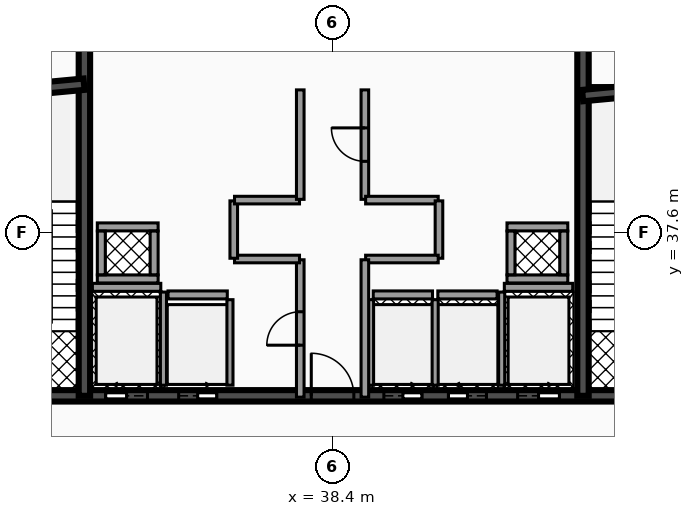
"""IFC4 building model, lengths in metres.
Left out: names, types, materials, properties, quantities, classifications, styles, units other than length and angle.
Written with IfcOpenShell. Run it as: python <this file> out.ifc"""

import sys

from ifc_helpers import new_model, si_unit, direction, frame, frame_2d, origin, place, context, subcontext, project, spatial, rectangle, extrude, element, fill, save


model = new_model("IFC4")
c1 = context("Model", 3, precision=1e-05, world=origin(), true_north=direction((0.0, 1.0)))
c2 = subcontext(c1, "Body", "Model", "MODEL_VIEW")
j1 = project(units=[si_unit("LENGTHUNIT", "METRE"), si_unit("PLANEANGLEUNIT", "RADIAN")], contexts=[c1])
p1 = place(None, origin())
s1 = spatial("IfcSite", under=j1, at=p1, CompositionType="ELEMENT")
p2 = place(p1, origin())
s2 = spatial("IfcBuilding", under=s1, at=p2, CompositionType="ELEMENT")
p3 = place(p2, frame((0.0, 0.0, 199.92)))
s3 = spatial("IfcBuildingStorey", under=s2, at=p3, CompositionType="ELEMENT", Elevation=199.92)
p4 = place(p3, frame((28.5, 33.3, 0.0), z_axis=(0.0, 0.0, 1.0), x_axis=(1.0, 0.0, 0.0)))
e1 = element("IfcWall", 1, at=p4, inside=s3, PredefinedType="SHEAR", context=c2, shape_type="SweptSolid", body=[
    extrude(rectangle(XDim=19.86, YDim=0.3, at=frame_2d((9.93, 0.0))), origin(), (0.0, 0.0, 1.0), 4.12),
])
p5 = place(p4, frame((3.93, 0.0, 0.0)))
e2 = element("IfcOpeningElement", 2, at=p5, cuts=e1, PredefinedType="OPENING", context=c2, shape_type="SweptSolid", body=[
    extrude(rectangle(XDim=1.1, YDim=2.15, at=frame_2d((0.55, 1.075))), frame((0.0, 0.16, 0.0), z_axis=(0.0, -1.0, 0.0), x_axis=(1.0, 0.0, 0.0)), (0.0, 0.0, 1.0), 0.32),
])
p6 = place(p4, frame((14.77, 0.0, 0.0)))
e3 = element("IfcOpeningElement", 3, at=p6, cuts=e1, PredefinedType="OPENING", context=c2, shape_type="SweptSolid", body=[
    extrude(rectangle(XDim=1.1, YDim=2.15, at=frame_2d((0.55, 1.075))), frame((0.0, 0.16, 0.0), z_axis=(0.0, -1.0, 0.0), x_axis=(1.0, 0.0, 0.0)), (0.0, 0.0, 1.0), 0.32),
])
p7 = place(p4, frame((11.25, 0.0, 0.0)))
e4 = element("IfcOpeningElement", 4, at=p7, cuts=e1, PredefinedType="OPENING", context=c2, shape_type="SweptSolid", body=[
    extrude(rectangle(XDim=1.0, YDim=2.1, at=frame_2d((0.5, 1.05))), frame((0.0, 0.16, 0.0), z_axis=(0.0, -1.0, 0.0), x_axis=(1.0, 0.0, 0.0)), (0.0, 0.0, 1.0), 0.32),
])
p8 = place(p4, frame((12.95, 0.0, 0.0)))
e5 = element("IfcOpeningElement", 5, at=p8, cuts=e1, PredefinedType="OPENING", context=c2, shape_type="SweptSolid", body=[
    extrude(rectangle(XDim=1.0, YDim=2.1, at=frame_2d((0.5, 1.05))), frame((0.0, 0.16, 0.0), z_axis=(0.0, -1.0, 0.0), x_axis=(1.0, 0.0, 0.0)), (0.0, 0.0, 1.0), 0.32),
])
p9 = place(p4, frame((5.85, 0.0, 0.0)))
e6 = element("IfcOpeningElement", 6, at=p9, cuts=e1, PredefinedType="OPENING", context=c2, shape_type="SweptSolid", body=[
    extrude(rectangle(XDim=1.0, YDim=2.1, at=frame_2d((0.5, 1.05))), frame((0.0, 0.16, 0.0), z_axis=(0.0, -1.0, 0.0), x_axis=(1.0, 0.0, 0.0)), (0.0, 0.0, 1.0), 0.32),
])
p10 = place(p4, frame((1.21, 0.0, 0.0)))
e7 = element("IfcOpeningElement", 7, at=p10, cuts=e1, PredefinedType="OPENING", context=c2, shape_type="SweptSolid", body=[
    extrude(rectangle(XDim=1.1, YDim=2.2, at=frame_2d((0.55, 1.1))), frame((0.0, 0.16, 0.0), z_axis=(0.0, -1.0, 0.0), x_axis=(1.0, 0.0, 0.0)), (0.0, 0.0, 1.0), 0.32),
])
p11 = place(p4, frame((9.34, 0.0, 0.0)))
e8 = element("IfcOpeningElement", 8, at=p11, cuts=e1, PredefinedType="OPENING", context=c2, shape_type="SweptSolid", body=[
    extrude(rectangle(XDim=1.12, YDim=2.05, at=frame_2d((0.56, 1.025))), frame((0.0, 0.16, 0.0), z_axis=(0.0, -1.0, 0.0), x_axis=(1.0, 0.0, 0.0)), (0.0, 0.0, 1.0), 0.32),
])
p12 = place(p4, frame((17.55, 0.0, 0.0)))
e9 = element("IfcOpeningElement", 9, at=p12, cuts=e1, PredefinedType="OPENING", context=c2, shape_type="SweptSolid", body=[
    extrude(rectangle(XDim=1.1, YDim=2.2, at=frame_2d((0.55, 1.1))), frame((0.0, 0.16, 0.0), z_axis=(0.0, -1.0, 0.0), x_axis=(1.0, 0.0, 0.0)), (0.0, 0.0, 1.0), 0.32),
])
for number, where, z_axis, x_axis in (
    (10, (31.87, 33.3, 0.0), (0.0, 0.0, 1.0), (0.0, 1.0, 0.0)),
    (11, (44.99, 33.3, 0.0), (0.0, 0.0, 1.0), (0.0, 1.0, 0.0)),
):
    element("IfcWall", number, at=place(p3, frame(where, z_axis=z_axis, x_axis=x_axis)), inside=s3, PredefinedType="SHEAR", context=c2, shape_type="SweptSolid", body=[
        extrude(rectangle(XDim=10.1, YDim=0.3, at=frame_2d((5.05, 0.0))), origin(), (0.0, 0.0, 1.0), 4.12),
    ])
p13 = place(p3, frame((28.64, 41.2, 0.0), z_axis=(0.0, 0.0, 1.0), x_axis=(0.995687118776, 0.092774789157, 0.0)))
e12 = element("IfcWall", 12, at=p13, inside=s3, PredefinedType="SHEAR", context=c2, shape_type="SweptSolid", body=[
    extrude(rectangle(XDim=3.234, YDim=0.3, at=frame_2d((1.617, 0.0))), origin(), (0.0, 0.0, 1.0), 4.12),
])
p14 = place(p3, frame((44.98, 41.2, 0.0), z_axis=(0.0, 0.0, 1.0), x_axis=(0.995686468965, 0.09278176286, 0.0)))
e13 = element("IfcWall", 13, at=p14, inside=s3, PredefinedType="SHEAR", context=c2, shape_type="SweptSolid", body=[
    extrude(rectangle(XDim=3.234, YDim=0.3, at=frame_2d((1.617, 0.0))), origin(), (0.0, 0.0, 1.0), 4.12),
])
p15 = place(p3, frame((32.08, 36.155, 0.0), z_axis=(0.0, 0.0, 1.0), x_axis=(1.0, 0.0, 0.0)))
e14 = element("IfcWall", 14, at=p15, inside=s3, PredefinedType="SOLIDWALL", context=c2, shape_type="SweptSolid", body=[
    extrude(rectangle(XDim=1.8, YDim=0.21, at=frame_2d((0.9, 0.0))), origin(), (0.0, 0.0, 1.0), 3.092),
])
p16 = place(p3, frame((33.95, 33.58, 0.0), z_axis=(0.0, 0.0, 1.0), x_axis=(0.0, 1.0, 0.0)))
e15 = element("IfcWall", 15, at=p16, inside=s3, PredefinedType="SOLIDWALL", context=c2, shape_type="SweptSolid", body=[
    extrude(rectangle(XDim=2.45, YDim=0.16, at=frame_2d((1.225, 0.0))), origin(), (0.0, 0.0, 1.0), 3.092),
])
p17 = place(p3, frame((42.92, 36.155, 0.0), z_axis=(0.0, 0.0, 1.0), x_axis=(1.0, 0.0, 0.0)))
e16 = element("IfcWall", 16, at=p17, inside=s3, PredefinedType="SOLIDWALL", context=c2, shape_type="SweptSolid", body=[
    extrude(rectangle(XDim=1.8, YDim=0.21, at=frame_2d((0.9, 0.0))), origin(), (0.0, 0.0, 1.0), 3.092),
])
p18 = place(p3, frame((42.85, 33.58, 0.0), z_axis=(0.0, 0.0, 1.0), x_axis=(0.0, 1.0, 0.0)))
e17 = element("IfcWall", 17, at=p18, inside=s3, PredefinedType="SOLIDWALL", context=c2, shape_type="SweptSolid", body=[
    extrude(rectangle(XDim=2.45, YDim=0.16, at=frame_2d((1.225, 0.0))), origin(), (0.0, 0.0, 1.0), 3.092),
])
p19 = place(p3, frame((39.47, 35.955, 0.0), z_axis=(0.0, 0.0, 1.0), x_axis=(1.0, 0.0, 0.0)))
e18 = element("IfcWall", 18, at=p19, inside=s3, PredefinedType="SOLIDWALL", context=c2, shape_type="SweptSolid", body=[
    extrude(rectangle(XDim=1.56, YDim=0.21, at=frame_2d((0.78, 0.0))), origin(), (0.0, 0.0, 1.0), 3.092),
])
for number, where, z_axis, x_axis in (
    (19, (39.4, 33.58, 0.0), (0.0, 0.0, 1.0), (0.0, 1.0, 0.0)),
    (20, (41.1, 33.58, 0.0), (0.0, 0.0, 1.0), (0.0, 1.0, 0.0)),
):
    element("IfcWall", number, at=place(p3, frame(where, z_axis=z_axis, x_axis=x_axis)), inside=s3, PredefinedType="SOLIDWALL", context=c2, shape_type="SweptSolid", body=[
        extrude(rectangle(XDim=2.25, YDim=0.16, at=frame_2d((1.125, 0.0))), origin(), (0.0, 0.0, 1.0), 3.092),
    ])
p20 = place(p3, frame((41.17, 35.955, 0.0), z_axis=(0.0, 0.0, 1.0), x_axis=(1.0, 0.0, 0.0)))
e21 = element("IfcWall", 21, at=p20, inside=s3, PredefinedType="SOLIDWALL", context=c2, shape_type="SweptSolid", body=[
    extrude(rectangle(XDim=1.56, YDim=0.21, at=frame_2d((0.78, 0.0))), origin(), (0.0, 0.0, 1.0), 3.092),
])
p21 = place(p3, frame((34.07, 35.955, 0.0), z_axis=(0.0, 0.0, 1.0), x_axis=(1.0, 0.0, 0.0)))
e22 = element("IfcWall", 22, at=p21, inside=s3, PredefinedType="SOLIDWALL", context=c2, shape_type="SweptSolid", body=[
    extrude(rectangle(XDim=1.56, YDim=0.21, at=frame_2d((0.78, 0.0))), origin(), (0.0, 0.0, 1.0), 3.092),
])
p22 = place(p3, frame((35.7, 33.58, 0.0), z_axis=(0.0, 0.0, 1.0), x_axis=(0.0, 1.0, 0.0)))
e23 = element("IfcWall", 23, at=p22, inside=s3, PredefinedType="SOLIDWALL", context=c2, shape_type="SweptSolid", body=[
    extrude(rectangle(XDim=2.25, YDim=0.16, at=frame_2d((1.125, 0.0))), origin(), (0.0, 0.0, 1.0), 3.092),
])
for number, where, z_axis, x_axis in (
    (24, (32.21, 36.375, 0.0), (0.0, 0.0, 1.0), (1.0, 0.0, 0.0)),
    (25, (32.21, 37.745, 0.0), (0.0, 0.0, 1.0), (1.0, 0.0, 0.0)),
):
    element("IfcWall", number, at=place(p3, frame(where, z_axis=z_axis, x_axis=x_axis)), inside=s3, PredefinedType="SOLIDWALL", context=c2, shape_type="SweptSolid", body=[
        extrude(rectangle(XDim=1.6, YDim=0.21, at=frame_2d((0.8, 0.0))), origin(), (0.0, 0.0, 1.0), 4.12),
    ])
for number, where, z_axis, x_axis in (
    (26, (32.315, 36.485, 0.0), (0.0, 0.0, 1.0), (0.0, 1.0, 0.0)),
    (27, (33.705, 36.485, 0.0), (0.0, 0.0, 1.0), (0.0, 1.0, 0.0)),
):
    element("IfcWall", number, at=place(p3, frame(where, z_axis=z_axis, x_axis=x_axis)), inside=s3, PredefinedType="SOLIDWALL", context=c2, shape_type="SweptSolid", body=[
        extrude(rectangle(XDim=1.15, YDim=0.21, at=frame_2d((0.575, 0.0))), origin(), (0.0, 0.0, 1.0), 4.12),
    ])
for number, where, z_axis, x_axis in (
    (28, (42.99, 36.375, 0.0), (0.0, 0.0, 1.0), (1.0, 0.0, 0.0)),
    (29, (42.99, 37.745, 0.0), (0.0, 0.0, 1.0), (1.0, 0.0, 0.0)),
):
    element("IfcWall", number, at=place(p3, frame(where, z_axis=z_axis, x_axis=x_axis)), inside=s3, PredefinedType="SOLIDWALL", context=c2, shape_type="SweptSolid", body=[
        extrude(rectangle(XDim=1.6, YDim=0.21, at=frame_2d((0.8, 0.0))), origin(), (0.0, 0.0, 1.0), 4.12),
    ])
for number, where, z_axis, x_axis in (
    (30, (43.095, 36.485, 0.0), (0.0, 0.0, 1.0), (0.0, 1.0, 0.0)),
    (31, (44.485, 36.485, 0.0), (0.0, 0.0, 1.0), (0.0, 1.0, 0.0)),
):
    element("IfcWall", number, at=place(p3, frame(where, z_axis=z_axis, x_axis=x_axis)), inside=s3, PredefinedType="SOLIDWALL", context=c2, shape_type="SweptSolid", body=[
        extrude(rectangle(XDim=1.15, YDim=0.21, at=frame_2d((0.575, 0.0))), origin(), (0.0, 0.0, 1.0), 4.12),
    ])
p23 = place(p3, frame((37.55, 33.265, 0.0), z_axis=(0.0, 0.0, 1.0), x_axis=(0.0, 1.0, 0.0)))
e32 = element("IfcWall", 32, at=p23, inside=s3, PredefinedType="PARTITIONING", context=c2, shape_type="SweptSolid", body=[
    extrude(rectangle(XDim=3.615, YDim=0.2, at=frame_2d((1.808, 0.0))), origin(), (0.0, 0.0, 1.0), 3.077),
])
p24 = place(p23, frame((1.367, 0.0, 0.0)))
e33 = element("IfcOpeningElement", 33, at=p24, cuts=e32, PredefinedType="OPENING", context=c2, shape_type="SweptSolid", body=[
    extrude(rectangle(XDim=0.88, YDim=2.05, at=frame_2d((0.44, 1.025))), frame((0.0, 0.11, 0.0), z_axis=(0.0, -1.0, 0.0), x_axis=(1.0, 0.0, 0.0)), (0.0, 0.0, 1.0), 0.22),
])
p25 = place(p3, frame((35.82, 36.9, 0.0), z_axis=(0.0, 0.0, 1.0), x_axis=(1.0, 0.0, 0.0)))
e34 = element("IfcWall", 34, at=p25, inside=s3, PredefinedType="PARTITIONING", context=c2, shape_type="SweptSolid", body=[
    extrude(rectangle(XDim=1.71, YDim=0.2, at=frame_2d((0.855, 0.0))), origin(), (0.0, 0.0, 1.0), 3.077),
])
p26 = place(p3, frame((35.8, 36.92, 0.0), z_axis=(0.0, 0.0, 1.0), x_axis=(0.0, 1.0, 0.0)))
e35 = element("IfcWall", 35, at=p26, inside=s3, PredefinedType="PARTITIONING", context=c2, shape_type="SweptSolid", body=[
    extrude(rectangle(XDim=1.51, YDim=0.2, at=frame_2d((0.755, 0.0))), origin(), (0.0, 0.0, 1.0), 3.077),
])
p27 = place(p3, frame((35.82, 38.45, 0.0), z_axis=(0.0, 0.0, 1.0), x_axis=(1.0, 0.0, 0.0)))
e36 = element("IfcWall", 36, at=p27, inside=s3, PredefinedType="PARTITIONING", context=c2, shape_type="SweptSolid", body=[
    extrude(rectangle(XDim=1.71, YDim=0.2, at=frame_2d((0.855, 0.0))), origin(), (0.0, 0.0, 1.0), 3.077),
])
p28 = place(p3, frame((37.55, 38.47, 0.0), z_axis=(0.0, 0.0, 1.0), x_axis=(0.0, 1.0, 0.0)))
e37 = element("IfcWall", 37, at=p28, inside=s3, PredefinedType="PARTITIONING", context=c2, shape_type="SweptSolid", body=[
    extrude(rectangle(XDim=2.88, YDim=0.2, at=frame_2d((1.44, 0.0))), origin(), (0.0, 0.0, 1.0), 3.077),
])
p29 = place(p3, frame((39.25, 38.47, 0.0), z_axis=(0.0, 0.0, 1.0), x_axis=(0.0, 1.0, 0.0)))
e38 = element("IfcWall", 38, at=p29, inside=s3, PredefinedType="PARTITIONING", context=c2, shape_type="SweptSolid", body=[
    extrude(rectangle(XDim=2.88, YDim=0.2, at=frame_2d((1.44, 0.0))), origin(), (0.0, 0.0, 1.0), 3.077),
])
p30 = place(p29, frame((1.0, 0.0, 0.0)))
e39 = element("IfcOpeningElement", 39, at=p30, cuts=e38, PredefinedType="OPENING", context=c2, shape_type="SweptSolid", body=[
    extrude(rectangle(XDim=0.88, YDim=2.05, at=frame_2d((0.44, 1.025))), frame((0.0, 0.11, 0.0), z_axis=(0.0, -1.0, 0.0), x_axis=(1.0, 0.0, 0.0)), (0.0, 0.0, 1.0), 0.22),
])
p31 = place(p3, frame((39.27, 38.45, 0.0), z_axis=(0.0, 0.0, 1.0), x_axis=(1.0, 0.0, 0.0)))
e40 = element("IfcWall", 40, at=p31, inside=s3, PredefinedType="PARTITIONING", context=c2, shape_type="SweptSolid", body=[
    extrude(rectangle(XDim=1.91, YDim=0.2, at=frame_2d((0.955, 0.0))), origin(), (0.0, 0.0, 1.0), 3.077),
])
p32 = place(p3, frame((41.2, 36.92, 0.0), z_axis=(0.0, 0.0, 1.0), x_axis=(0.0, 1.0, 0.0)))
e41 = element("IfcWall", 41, at=p32, inside=s3, PredefinedType="PARTITIONING", context=c2, shape_type="SweptSolid", body=[
    extrude(rectangle(XDim=1.51, YDim=0.2, at=frame_2d((0.755, 0.0))), origin(), (0.0, 0.0, 1.0), 3.077),
])
p33 = place(p3, frame((39.27, 36.9, 0.0), z_axis=(0.0, 0.0, 1.0), x_axis=(1.0, 0.0, 0.0)))
e42 = element("IfcWall", 42, at=p33, inside=s3, PredefinedType="PARTITIONING", context=c2, shape_type="SweptSolid", body=[
    extrude(rectangle(XDim=1.91, YDim=0.2, at=frame_2d((0.955, 0.0))), origin(), (0.0, 0.0, 1.0), 3.077),
])
p34 = place(p3, frame((39.25, 33.265, 0.0), z_axis=(0.0, 0.0, 1.0), x_axis=(0.0, 1.0, 0.0)))
e43 = element("IfcWall", 43, at=p34, inside=s3, PredefinedType="PARTITIONING", context=c2, shape_type="SweptSolid", body=[
    extrude(rectangle(XDim=3.615, YDim=0.2, at=frame_2d((1.808, 0.0))), origin(), (0.0, 0.0, 1.0), 3.077),
])
p35 = place(p5, origin())
e44 = element("IfcDoor", 44, at=p35, inside=s3, OperationType="SLIDING_TO_LEFT", PredefinedType="DOOR", context=c2, shape_type="SweptSolid", body=[
    extrude(rectangle(XDim=1.1, YDim=2.15, at=frame_2d((0.55, 1.075))), frame((0.0, 0.025, 0.0), z_axis=(0.0, -1.0, 0.0), x_axis=(1.0, 0.0, 0.0)), (0.0, 0.0, 1.0), 0.05),
])
fill(e2, e44)
p36 = place(p6, origin())
e45 = element("IfcDoor", 45, at=p36, inside=s3, OperationType="SLIDING_TO_RIGHT", PredefinedType="DOOR", context=c2, shape_type="SweptSolid", body=[
    extrude(rectangle(XDim=1.1, YDim=2.15, at=frame_2d((0.55, 1.075))), frame((0.0, 0.025, 0.0), z_axis=(0.0, -1.0, 0.0), x_axis=(1.0, 0.0, 0.0)), (0.0, 0.0, 1.0), 0.05),
])
fill(e3, e45)
p37 = place(p7, origin())
e46 = element("IfcDoor", 46, at=p37, inside=s3, OperationType="SLIDING_TO_RIGHT", PredefinedType="DOOR", context=c2, shape_type="SweptSolid", body=[
    extrude(rectangle(XDim=1.0, YDim=2.1, at=frame_2d((0.5, 1.05))), frame((0.0, 0.025, 0.0), z_axis=(0.0, -1.0, 0.0), x_axis=(1.0, 0.0, 0.0)), (0.0, 0.0, 1.0), 0.05),
])
fill(e4, e46)
p38 = place(p8, origin())
e47 = element("IfcDoor", 47, at=p38, inside=s3, OperationType="SLIDING_TO_LEFT", PredefinedType="DOOR", context=c2, shape_type="SweptSolid", body=[
    extrude(rectangle(XDim=1.0, YDim=2.1, at=frame_2d((0.5, 1.05))), frame((0.0, 0.025, 0.0), z_axis=(0.0, -1.0, 0.0), x_axis=(1.0, 0.0, 0.0)), (0.0, 0.0, 1.0), 0.05),
])
fill(e5, e47)
p39 = place(p9, origin())
e48 = element("IfcDoor", 48, at=p39, inside=s3, OperationType="SLIDING_TO_RIGHT", PredefinedType="DOOR", context=c2, shape_type="SweptSolid", body=[
    extrude(rectangle(XDim=1.0, YDim=2.1, at=frame_2d((0.5, 1.05))), frame((0.0, 0.025, 0.0), z_axis=(0.0, -1.0, 0.0), x_axis=(1.0, 0.0, 0.0)), (0.0, 0.0, 1.0), 0.05),
])
fill(e6, e48)
p40 = place(p11, origin())
e49 = element("IfcDoor", 49, at=p40, inside=s3, OperationType="SINGLE_SWING_LEFT", PredefinedType="DOOR", context=c2, shape_type="SweptSolid", body=[
    extrude(rectangle(XDim=1.12, YDim=2.05, at=frame_2d((0.56, 1.025))), frame((0.0, 0.025, 0.0), z_axis=(0.0, -1.0, 0.0), x_axis=(1.0, 0.0, 0.0)), (0.0, 0.0, 1.0), 0.05),
])
fill(e8, e49)
p41 = place(p24, origin())
e50 = element("IfcDoor", 50, at=p41, inside=s3, OperationType="SINGLE_SWING_LEFT", PredefinedType="DOOR", context=c2, shape_type="SweptSolid", body=[
    extrude(rectangle(XDim=0.88, YDim=2.05, at=frame_2d((0.44, 1.025))), frame((0.0, 0.025, 0.0), z_axis=(0.0, -1.0, 0.0), x_axis=(1.0, 0.0, 0.0)), (0.0, 0.0, 1.0), 0.05),
])
fill(e33, e50)
p42 = place(p30, origin())
e51 = element("IfcDoor", 51, at=p42, inside=s3, OperationType="SINGLE_SWING_RIGHT", PredefinedType="DOOR", context=c2, shape_type="SweptSolid", body=[
    extrude(rectangle(XDim=0.88, YDim=2.05, at=frame_2d((0.44, 1.025))), frame((0.0, 0.025, 0.0), z_axis=(0.0, -1.0, 0.0), x_axis=(1.0, 0.0, 0.0)), (0.0, 0.0, 1.0), 0.05),
])
fill(e39, e51)
save(model, sys.argv[1])
